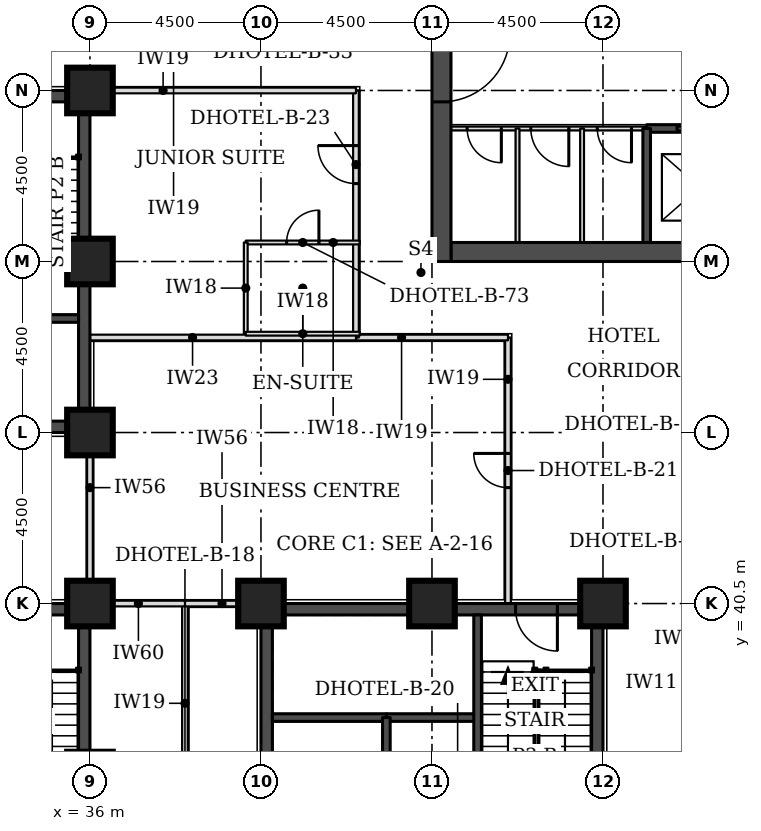
"""IFC4 building model, lengths in metres.
Left out: names, types, materials, properties, quantities, classifications, styles, units other than length and angle.
Written with IfcOpenShell. Run it as: python <this file> out.ifc"""

import sys

from ifc_helpers import new_model, si_unit, direction, frame, frame_2d, origin, origin_2d, place, context, subcontext, project, spatial, rectangle, extrude, element, fill, save


model = new_model("IFC4")
c1 = context("Model", 3, precision=1e-05, world=origin(), true_north=direction((0.0, 1.0)))
c2 = subcontext(c1, "Body", "Model", "MODEL_VIEW")
j1 = project(units=[si_unit("LENGTHUNIT", "METRE"), si_unit("PLANEANGLEUNIT", "RADIAN")], contexts=[c1])
p1 = place(None, origin())
s1 = spatial("IfcSite", under=j1, at=p1, CompositionType="ELEMENT")
p2 = place(p1, origin())
s2 = spatial("IfcBuilding", under=s1, at=p2, CompositionType="ELEMENT")
p3 = place(p2, frame((0.0, 0.0, 52.8)))
s3 = spatial("IfcBuildingStorey", under=s2, at=p3, CompositionType="ELEMENT", Elevation=52.8)
for number, where, z_axis, x_axis in (
    (1, (36.0, 40.5, 0.0), (0.0, 0.0, 1.0), (1.0, 0.0, 0.0)),
    (2, (40.5, 40.5, 0.0), (0.0, 0.0, 1.0), (1.0, 0.0, 0.0)),
    (3, (45.0, 40.5, 0.0), (0.0, 0.0, 1.0), (1.0, 0.0, 0.0)),
    (4, (49.5, 40.5, 0.0), (0.0, 0.0, 1.0), (1.0, 0.0, 0.0)),
    (5, (36.0, 45.0, 0.0), (0.0, 0.0, 1.0), (1.0, 0.0, 0.0)),
    (6, (36.0, 49.5, 0.0), (0.0, 0.0, 1.0), (1.0, 0.0, 0.0)),
    (7, (36.0, 54.0, 0.0), (0.0, 0.0, 1.0), (1.0, 0.0, 0.0)),
):
    element("IfcColumn", number, at=place(p3, frame(where, z_axis=z_axis, x_axis=x_axis)), inside=s3, PredefinedType="COLUMN", context=c2, shape_type="SweptSolid", body=[
        extrude(rectangle(XDim=1.2, YDim=1.2, at=origin_2d()), origin(), (0.0, 0.0, 1.0), 3.3),
    ])
p4 = place(p3, frame((45.5, 49.75, 0.0), z_axis=(0.0, 0.0, 1.0), x_axis=(1.0, 0.0, 0.0)))
e8 = element("IfcWall", 8, at=p4, inside=s3, PredefinedType="SHEAR", context=c2, shape_type="SweptSolid", body=[
    extrude(rectangle(XDim=21.5, YDim=0.5, at=frame_2d((10.75, 0.0))), origin(), (0.0, 0.0, 1.0), 3.3),
])
p5 = place(p3, frame((45.25, 49.5, 0.0), z_axis=(0.0, 0.0, 1.0), x_axis=(0.0, 1.0, 0.0)))
e9 = element("IfcWall", 9, at=p5, inside=s3, PredefinedType="SHEAR", context=c2, shape_type="SweptSolid", body=[
    extrude(rectangle(XDim=22.5, YDim=0.5, at=frame_2d((11.25, 0.0))), origin(), (0.0, 0.0, 1.0), 3.3),
])
p6 = place(p5, frame((4.2, 0.0, 0.0)))
e10 = element("IfcOpeningElement", 10, at=p6, cuts=e9, PredefinedType="OPENING", context=c2, shape_type="SweptSolid", body=[
    extrude(rectangle(XDim=1.8, YDim=2.1, at=frame_2d((0.9, 1.05))), frame((0.0, 0.26, 0.0), z_axis=(0.0, -1.0, 0.0), x_axis=(1.0, 0.0, 0.0)), (0.0, 0.0, 1.0), 0.52),
])
p7 = place(p5, frame((6.9, 0.0, 0.0)))
e11 = element("IfcOpeningElement", 11, at=p7, cuts=e9, PredefinedType="OPENING", context=c2, shape_type="SweptSolid", body=[
    extrude(rectangle(XDim=1.1, YDim=2.1, at=frame_2d((0.55, 1.05))), frame((0.0, 0.26, 0.0), z_axis=(0.0, -1.0, 0.0), x_axis=(1.0, 0.0, 0.0)), (0.0, 0.0, 1.0), 0.52),
])
p8 = place(p5, frame((13.6, 0.0, 0.0)))
e12 = element("IfcOpeningElement", 12, at=p8, cuts=e9, PredefinedType="OPENING", context=c2, shape_type="SweptSolid", body=[
    extrude(rectangle(XDim=1.1, YDim=2.1, at=frame_2d((0.55, 1.05))), frame((0.0, 0.26, 0.0), z_axis=(0.0, -1.0, 0.0), x_axis=(1.0, 0.0, 0.0)), (0.0, 0.0, 1.0), 0.52),
])
p9 = place(p5, frame((16.5, 0.0, 0.0)))
e13 = element("IfcOpeningElement", 13, at=p9, cuts=e9, PredefinedType="OPENING", context=c2, shape_type="SweptSolid", body=[
    extrude(rectangle(XDim=1.8, YDim=2.1, at=frame_2d((0.9, 1.05))), frame((0.0, 0.26, 0.0), z_axis=(0.0, -1.0, 0.0), x_axis=(1.0, 0.0, 0.0)), (0.0, 0.0, 1.0), 0.52),
])
p10 = place(p3, frame((27.3, 45.15, 0.0), z_axis=(0.0, 0.0, 1.0), x_axis=(1.0, 0.0, 0.0)))
e14 = element("IfcWall", 14, at=p10, inside=s3, PredefinedType="SHEAR", context=c2, shape_type="SweptSolid", body=[
    extrude(rectangle(XDim=8.4, YDim=0.3, at=frame_2d((4.2, 0.0))), origin(), (0.0, 0.0, 1.0), 3.3),
])
p11 = place(p10, frame((5.2, 0.0, 0.0)))
e15 = element("IfcOpeningElement", 15, at=p11, cuts=e14, PredefinedType="OPENING", context=c2, shape_type="SweptSolid", body=[
    extrude(rectangle(XDim=1.0, YDim=2.1, at=frame_2d((0.5, 1.05))), frame((0.0, 0.16, 0.0), z_axis=(0.0, -1.0, 0.0), x_axis=(1.0, 0.0, 0.0)), (0.0, 0.0, 1.0), 0.32),
])
p12 = place(p3, frame((27.3, 53.85, 0.0), z_axis=(0.0, 0.0, 1.0), x_axis=(1.0, 0.0, 0.0)))
e16 = element("IfcWall", 16, at=p12, inside=s3, PredefinedType="SHEAR", context=c2, shape_type="SweptSolid", body=[
    extrude(rectangle(XDim=8.4, YDim=0.3, at=frame_2d((4.2, 0.0))), origin(), (0.0, 0.0, 1.0), 3.3),
])
p13 = place(p12, frame((6.4, 0.0, 0.0)))
e17 = element("IfcOpeningElement", 17, at=p13, cuts=e16, PredefinedType="OPENING", context=c2, shape_type="SweptSolid", body=[
    extrude(rectangle(XDim=1.1, YDim=2.1, at=frame_2d((0.55, 1.05))), frame((0.0, 0.16, 0.0), z_axis=(0.0, -1.0, 0.0), x_axis=(1.0, 0.0, 0.0)), (0.0, 0.0, 1.0), 0.32),
])
p14 = place(p3, frame((35.85, 45.0, 0.0), z_axis=(0.0, 0.0, 1.0), x_axis=(0.0, 1.0, 0.0)))
e18 = element("IfcWall", 18, at=p14, inside=s3, PredefinedType="SHEAR", context=c2, shape_type="SweptSolid", body=[
    extrude(rectangle(XDim=9.0, YDim=0.3, at=frame_2d((4.5, 0.0))), origin(), (0.0, 0.0, 1.0), 3.3),
])
p15 = place(p3, frame((40.8, 40.35, 0.0), z_axis=(0.0, 0.0, 1.0), x_axis=(1.0, 0.0, 0.0)))
e19 = element("IfcWall", 19, at=p15, inside=s3, PredefinedType="SHEAR", context=c2, shape_type="SweptSolid", body=[
    extrude(rectangle(XDim=8.4, YDim=0.3, at=frame_2d((4.2, 0.0))), origin(), (0.0, 0.0, 1.0), 3.3),
])
p16 = place(p15, frame((6.4, 0.0, 0.0)))
e20 = element("IfcOpeningElement", 20, at=p16, cuts=e19, PredefinedType="OPENING", context=c2, shape_type="SweptSolid", body=[
    extrude(rectangle(XDim=1.1, YDim=2.1, at=frame_2d((0.55, 1.05))), frame((0.0, 0.16, 0.0), z_axis=(0.0, -1.0, 0.0), x_axis=(1.0, 0.0, 0.0)), (0.0, 0.0, 1.0), 0.32),
])
p17 = place(p3, frame((40.65, 31.5, 0.0), z_axis=(0.0, 0.0, 1.0), x_axis=(0.0, 1.0, 0.0)))
e21 = element("IfcWall", 21, at=p17, inside=s3, PredefinedType="SHEAR", context=c2, shape_type="SweptSolid", body=[
    extrude(rectangle(XDim=9.0, YDim=0.3, at=frame_2d((4.5, 0.0))), origin(), (0.0, 0.0, 1.0), 3.3),
])
p18 = place(p17, frame((0.4, 0.0, 0.0)))
e22 = element("IfcOpeningElement", 22, at=p18, cuts=e21, PredefinedType="OPENING", context=c2, shape_type="SweptSolid", body=[
    extrude(rectangle(XDim=1.1, YDim=2.1, at=frame_2d((0.55, 1.05))), frame((0.0, 0.16, 0.0), z_axis=(0.0, -1.0, 0.0), x_axis=(1.0, 0.0, 0.0)), (0.0, 0.0, 1.0), 0.32),
])
p19 = place(p3, frame((49.35, 31.5, 0.0), z_axis=(0.0, 0.0, 1.0), x_axis=(0.0, 1.0, 0.0)))
e23 = element("IfcWall", 23, at=p19, inside=s3, PredefinedType="SHEAR", context=c2, shape_type="SweptSolid", body=[
    extrude(rectangle(XDim=9.0, YDim=0.3, at=frame_2d((4.5, 0.0))), origin(), (0.0, 0.0, 1.0), 3.3),
])
p20 = place(p3, frame((27.3, 40.35, 0.0), z_axis=(0.0, 0.0, 1.0), x_axis=(1.0, 0.0, 0.0)))
e24 = element("IfcWall", 24, at=p20, inside=s3, PredefinedType="SHEAR", context=c2, shape_type="SweptSolid", body=[
    extrude(rectangle(XDim=8.4, YDim=0.3, at=frame_2d((4.2, 0.0))), origin(), (0.0, 0.0, 1.0), 3.3),
])
p21 = place(p20, frame((6.4, 0.0, 0.0)))
e25 = element("IfcOpeningElement", 25, at=p21, cuts=e24, PredefinedType="OPENING", context=c2, shape_type="SweptSolid", body=[
    extrude(rectangle(XDim=1.1, YDim=2.1, at=frame_2d((0.55, 1.05))), frame((0.0, 0.16, 0.0), z_axis=(0.0, -1.0, 0.0), x_axis=(1.0, 0.0, 0.0)), (0.0, 0.0, 1.0), 0.32),
])
p22 = place(p3, frame((35.85, 31.5, 0.0), z_axis=(0.0, 0.0, 1.0), x_axis=(0.0, 1.0, 0.0)))
e26 = element("IfcWall", 26, at=p22, inside=s3, PredefinedType="SHEAR", context=c2, shape_type="SweptSolid", body=[
    extrude(rectangle(XDim=9.0, YDim=0.3, at=frame_2d((4.5, 0.0))), origin(), (0.0, 0.0, 1.0), 3.3),
])
p23 = place(p3, frame((38.5, 25.65, 0.0), z_axis=(0.0, 0.0, 1.0), x_axis=(0.0, 1.0, 0.0)))
e27 = element("IfcWall", 27, at=p23, inside=s3, PredefinedType="PARTITIONING", context=c2, shape_type="SweptSolid", body=[
    extrude(rectangle(XDim=14.85, YDim=0.15, at=frame_2d((7.425, 0.0))), origin(), (0.0, 0.0, 1.0), 3.08),
])
p24 = place(p23, frame((7.54, 0.0, 0.0)))
e28 = element("IfcOpeningElement", 28, at=p24, cuts=e27, PredefinedType="OPENING", context=c2, shape_type="SweptSolid", body=[
    extrude(rectangle(XDim=0.9, YDim=2.1, at=frame_2d((0.45, 1.05))), frame((0.0, 0.085, 0.0), z_axis=(0.0, -1.0, 0.0), x_axis=(1.0, 0.0, 0.0)), (0.0, 0.0, 1.0), 0.17),
])
p25 = place(p3, frame((38.5, 40.5, 0.0), z_axis=(0.0, 0.0, 1.0), x_axis=(1.0, 0.0, 0.0)))
e29 = element("IfcWall", 29, at=p25, inside=s3, PredefinedType="PARTITIONING", context=c2, shape_type="SweptSolid", body=[
    extrude(rectangle(XDim=1.95, YDim=0.15, at=frame_2d((0.975, 0.0))), origin(), (0.0, 0.0, 1.0), 2.33),
])
p26 = place(p3, frame((36.0, 40.55, 0.0), z_axis=(0.0, 0.0, 1.0), x_axis=(0.0, 1.0, 0.0)))
e30 = element("IfcWall", 30, at=p26, inside=s3, PredefinedType="PARTITIONING", context=c2, shape_type="SweptSolid", body=[
    extrude(rectangle(XDim=4.4, YDim=0.15, at=frame_2d((2.2, 0.0))), origin(), (0.0, 0.0, 1.0), 2.33),
])
p27 = place(p3, frame((47.0, 40.5, 0.0), z_axis=(0.0, 0.0, 1.0), x_axis=(0.0, 1.0, 0.0)))
e31 = element("IfcWall", 31, at=p27, inside=s3, PredefinedType="PARTITIONING", context=c2, shape_type="SweptSolid", body=[
    extrude(rectangle(XDim=7.0, YDim=0.15, at=frame_2d((3.5, 0.0))), origin(), (0.0, 0.0, 1.0), 3.08),
])
p28 = place(p27, frame((3.05, 0.0, 0.0)))
e32 = element("IfcOpeningElement", 32, at=p28, cuts=e31, PredefinedType="OPENING", context=c2, shape_type="SweptSolid", body=[
    extrude(rectangle(XDim=0.9, YDim=2.1, at=frame_2d((0.45, 1.05))), frame((0.0, 0.085, 0.0), z_axis=(0.0, -1.0, 0.0), x_axis=(1.0, 0.0, 0.0)), (0.0, 0.0, 1.0), 0.17),
])
p29 = place(p3, frame((43.0, 47.5, 0.0), z_axis=(0.0, 0.0, 1.0), x_axis=(1.0, 0.0, 0.0)))
e33 = element("IfcWall", 33, at=p29, inside=s3, PredefinedType="PARTITIONING", context=c2, shape_type="SweptSolid", body=[
    extrude(rectangle(XDim=4.0, YDim=0.15, at=frame_2d((2.0, 0.0))), origin(), (0.0, 0.0, 1.0), 3.08),
])
p30 = place(p3, frame((43.0, 47.5, 0.0), z_axis=(0.0, 0.0, 1.0), x_axis=(0.0, 1.0, 0.0)))
e34 = element("IfcWall", 34, at=p30, inside=s3, PredefinedType="PARTITIONING", context=c2, shape_type="SweptSolid", body=[
    extrude(rectangle(XDim=6.5, YDim=0.15, at=frame_2d((3.25, 0.0))), origin(), (0.0, 0.0, 1.0), 3.08),
])
p31 = place(p30, frame((4.05, 0.0, 0.0)))
e35 = element("IfcOpeningElement", 35, at=p31, cuts=e34, PredefinedType="OPENING", context=c2, shape_type="SweptSolid", body=[
    extrude(rectangle(XDim=1.0, YDim=2.1, at=frame_2d((0.5, 1.05))), frame((0.0, 0.085, 0.0), z_axis=(0.0, -1.0, 0.0), x_axis=(1.0, 0.0, 0.0)), (0.0, 0.0, 1.0), 0.17),
])
p32 = place(p3, frame((36.05, 54.0, 0.0), z_axis=(0.0, 0.0, 1.0), x_axis=(1.0, 0.0, 0.0)))
e36 = element("IfcWall", 36, at=p32, inside=s3, PredefinedType="PARTITIONING", context=c2, shape_type="SweptSolid", body=[
    extrude(rectangle(XDim=6.95, YDim=0.15, at=frame_2d((3.475, 0.0))), origin(), (0.0, 0.0, 1.0), 3.08),
])
p33 = place(p3, frame((36.05, 40.5, 0.0), z_axis=(0.0, 0.0, 1.0), x_axis=(1.0, 0.0, 0.0)))
e37 = element("IfcWall", 37, at=p33, inside=s3, PredefinedType="PARTITIONING", context=c2, shape_type="SweptSolid", body=[
    extrude(rectangle(XDim=2.45, YDim=0.15, at=frame_2d((1.225, 0.0))), origin(), (0.0, 0.0, 1.0), 2.33),
])
p34 = place(p3, frame((36.0, 47.5, 0.0), z_axis=(0.0, 0.0, 1.0), x_axis=(1.0, 0.0, 0.0)))
e38 = element("IfcWall", 38, at=p34, inside=s3, PredefinedType="PARTITIONING", context=c2, shape_type="SweptSolid", body=[
    extrude(rectangle(XDim=7.0, YDim=0.15, at=frame_2d((3.5, 0.0))), origin(), (0.0, 0.0, 1.0), 3.08),
])
p35 = place(p3, frame((43.1, 50.0, 0.0), z_axis=(0.0, 0.0, 1.0), x_axis=(-1.0, 0.0, 0.0)))
e39 = element("IfcWall", 39, at=p35, inside=s3, PredefinedType="PARTITIONING", context=c2, shape_type="SweptSolid", body=[
    extrude(rectangle(XDim=3.0, YDim=0.1, at=frame_2d((1.5, 0.0))), origin(), (0.0, 0.0, 1.0), 3.08),
])
p36 = place(p35, frame((1.075, 0.0, 0.0)))
e40 = element("IfcOpeningElement", 40, at=p36, cuts=e39, PredefinedType="OPENING", context=c2, shape_type="SweptSolid", body=[
    extrude(rectangle(XDim=0.85, YDim=2.1, at=frame_2d((0.425, 1.05))), frame((0.0, 0.06, 0.0), z_axis=(0.0, -1.0, 0.0), x_axis=(1.0, 0.0, 0.0)), (0.0, 0.0, 1.0), 0.12),
])
p37 = place(p3, frame((40.1, 50.0, 0.0), z_axis=(0.0, 0.0, 1.0), x_axis=(0.0, -1.0, 0.0)))
e41 = element("IfcWall", 41, at=p37, inside=s3, PredefinedType="PARTITIONING", context=c2, shape_type="SweptSolid", body=[
    extrude(rectangle(XDim=2.4, YDim=0.1, at=frame_2d((1.2, 0.0))), origin(), (0.0, 0.0, 1.0), 3.08),
])
p38 = place(p3, frame((40.1, 47.6, 0.0), z_axis=(0.0, 0.0, 1.0), x_axis=(1.0, 0.0, 0.0)))
e42 = element("IfcWall", 42, at=p38, inside=s3, PredefinedType="PARTITIONING", context=c2, shape_type="SweptSolid", body=[
    extrude(rectangle(XDim=3.0, YDim=0.1, at=frame_2d((1.5, 0.0))), origin(), (0.0, 0.0, 1.0), 3.08),
])
p39 = place(p3, frame((45.5, 53.0, 0.0), z_axis=(0.0, 0.0, 1.0), x_axis=(1.0, 0.0, 0.0)))
e43 = element("IfcWall", 43, at=p39, inside=s3, PredefinedType="PARTITIONING", context=c2, shape_type="SweptSolid", body=[
    extrude(rectangle(XDim=5.15, YDim=0.1, at=frame_2d((2.575, 0.0))), origin(), (0.0, 0.0, 1.0), 3.08),
])
p40 = place(p39, frame((0.426, 0.0, 0.0)))
e44 = element("IfcOpeningElement", 44, at=p40, cuts=e43, PredefinedType="OPENING", context=c2, shape_type="SweptSolid", body=[
    extrude(rectangle(XDim=0.9, YDim=2.1, at=frame_2d((0.45, 1.05))), frame((0.0, 0.06, 0.0), z_axis=(0.0, -1.0, 0.0), x_axis=(1.0, 0.0, 0.0)), (0.0, 0.0, 1.0), 0.12),
])
p41 = place(p39, frame((2.101, 0.0, 0.0)))
e45 = element("IfcOpeningElement", 45, at=p41, cuts=e43, PredefinedType="OPENING", context=c2, shape_type="SweptSolid", body=[
    extrude(rectangle(XDim=1.0, YDim=2.1, at=frame_2d((0.5, 1.05))), frame((0.0, 0.06, 0.0), z_axis=(0.0, -1.0, 0.0), x_axis=(1.0, 0.0, 0.0)), (0.0, 0.0, 1.0), 0.12),
])
p42 = place(p39, frame((3.85, 0.0, 0.0)))
e46 = element("IfcOpeningElement", 46, at=p42, cuts=e43, PredefinedType="OPENING", context=c2, shape_type="SweptSolid", body=[
    extrude(rectangle(XDim=0.9, YDim=2.1, at=frame_2d((0.45, 1.05))), frame((0.0, 0.06, 0.0), z_axis=(0.0, -1.0, 0.0), x_axis=(1.0, 0.0, 0.0)), (0.0, 0.0, 1.0), 0.12),
])
p43 = place(p3, frame((50.65, 53.0, 0.0), z_axis=(0.0, 0.0, 1.0), x_axis=(1.0, 0.0, 0.0)))
e47 = element("IfcWall", 47, at=p43, inside=s3, PredefinedType="SOLIDWALL", context=c2, shape_type="SweptSolid", body=[
    extrude(rectangle(XDim=11.2, YDim=0.2, at=frame_2d((5.6, 0.0))), origin(), (0.0, 0.0, 1.0), 3.08),
])
p44 = place(p43, frame((0.8, 0.0, 0.0)))
e48 = element("IfcOpeningElement", 48, at=p44, cuts=e47, PredefinedType="OPENING", context=c2, shape_type="SweptSolid", body=[
    extrude(rectangle(XDim=1.2, YDim=2.1, at=frame_2d((0.6, 1.05))), frame((0.0, 0.11, 0.0), z_axis=(0.0, -1.0, 0.0), x_axis=(1.0, 0.0, 0.0)), (0.0, 0.0, 1.0), 0.22),
])
p45 = place(p43, frame((3.6, 0.0, 0.0)))
e49 = element("IfcOpeningElement", 49, at=p45, cuts=e47, PredefinedType="OPENING", context=c2, shape_type="SweptSolid", body=[
    extrude(rectangle(XDim=1.2, YDim=2.1, at=frame_2d((0.6, 1.05))), frame((0.0, 0.11, 0.0), z_axis=(0.0, -1.0, 0.0), x_axis=(1.0, 0.0, 0.0)), (0.0, 0.0, 1.0), 0.22),
])
p46 = place(p43, frame((6.4, 0.0, 0.0)))
e50 = element("IfcOpeningElement", 50, at=p46, cuts=e47, PredefinedType="OPENING", context=c2, shape_type="SweptSolid", body=[
    extrude(rectangle(XDim=1.2, YDim=2.1, at=frame_2d((0.6, 1.05))), frame((0.0, 0.11, 0.0), z_axis=(0.0, -1.0, 0.0), x_axis=(1.0, 0.0, 0.0)), (0.0, 0.0, 1.0), 0.22),
])
p47 = place(p43, frame((9.2, 0.0, 0.0)))
e51 = element("IfcOpeningElement", 51, at=p47, cuts=e47, PredefinedType="OPENING", context=c2, shape_type="SweptSolid", body=[
    extrude(rectangle(XDim=1.2, YDim=2.1, at=frame_2d((0.6, 1.05))), frame((0.0, 0.11, 0.0), z_axis=(0.0, -1.0, 0.0), x_axis=(1.0, 0.0, 0.0)), (0.0, 0.0, 1.0), 0.22),
])
for number, where, z_axis, x_axis in (
    (52, (47.251, 50.0, 0.0), (0.0, 0.0, 1.0), (0.0, 1.0, 0.0)),
    (53, (48.95, 50.0, 0.0), (0.0, 0.0, 1.0), (0.0, 1.0, 0.0)),
):
    element("IfcWall", number, at=place(p3, frame(where, z_axis=z_axis, x_axis=x_axis)), inside=s3, PredefinedType="PARTITIONING", context=c2, shape_type="SweptSolid", body=[
        extrude(rectangle(XDim=3.0, YDim=0.1, at=frame_2d((1.5, 0.0))), origin(), (0.0, 0.0, 1.0), 3.08),
    ])
for number, where, z_axis, x_axis in (
    (54, (50.65, 50.0, 0.0), (0.0, 0.0, 1.0), (0.0, 1.0, 0.0)),
    (55, (32.7, 48.0, 0.0), (0.0, 0.0, 1.0), (1.0, 0.0, 0.0)),
):
    element("IfcWall", number, at=place(p3, frame(where, z_axis=z_axis, x_axis=x_axis)), inside=s3, PredefinedType="SOLIDWALL", context=c2, shape_type="SweptSolid", body=[
        extrude(rectangle(XDim=3.0, YDim=0.2, at=frame_2d((1.5, 0.0))), origin(), (0.0, 0.0, 1.0), 3.08),
    ])
p48 = place(p3, frame((43.8, 37.5, 0.0), z_axis=(0.0, 0.0, 1.0), x_axis=(1.0, 0.0, 0.0)))
e56 = element("IfcWall", 56, at=p48, inside=s3, PredefinedType="SOLIDWALL", context=c2, shape_type="SweptSolid", body=[
    extrude(rectangle(XDim=2.4, YDim=0.2, at=frame_2d((1.2, 0.0))), origin(), (0.0, 0.0, 1.0), 3.3),
])
p49 = place(p3, frame((40.8, 37.5, 0.0), z_axis=(0.0, 0.0, 1.0), x_axis=(1.0, 0.0, 0.0)))
e57 = element("IfcWall", 57, at=p49, inside=s3, PredefinedType="SOLIDWALL", context=c2, shape_type="SweptSolid", body=[
    extrude(rectangle(XDim=3.0, YDim=0.2, at=frame_2d((1.5, 0.0))), origin(), (0.0, 0.0, 1.0), 3.08),
])
for number, where, z_axis, x_axis in (
    (58, (43.8, 31.8, 0.0), (0.0, 0.0, 1.0), (0.0, 1.0, 0.0)),
    (59, (46.2, 34.5, 0.0), (0.0, 0.0, 1.0), (0.0, 1.0, 0.0)),
):
    element("IfcWall", number, at=place(p3, frame(where, z_axis=z_axis, x_axis=x_axis)), inside=s3, PredefinedType="SOLIDWALL", context=c2, shape_type="SweptSolid", body=[
        extrude(rectangle(XDim=5.7, YDim=0.2, at=frame_2d((2.85, 0.0))), origin(), (0.0, 0.0, 1.0), 3.08),
    ])
p50 = place(p28, origin())
e60 = element("IfcDoor", 60, at=p50, inside=s3, OperationType="SINGLE_SWING_RIGHT", PredefinedType="DOOR", context=c2, shape_type="SweptSolid", body=[
    extrude(rectangle(XDim=0.9, YDim=2.1, at=frame_2d((0.45, 1.05))), frame((0.0, 0.025, 0.0), z_axis=(0.0, -1.0, 0.0), x_axis=(1.0, 0.0, 0.0)), (0.0, 0.0, 1.0), 0.05),
])
fill(e32, e60)
p51 = place(p31, origin())
e61 = element("IfcDoor", 61, at=p51, inside=s3, OperationType="SINGLE_SWING_RIGHT", PredefinedType="DOOR", context=c2, shape_type="SweptSolid", body=[
    extrude(rectangle(XDim=1.0, YDim=2.1, at=frame_2d((0.5, 1.05))), frame((0.0, 0.025, 0.0), z_axis=(0.0, -1.0, 0.0), x_axis=(1.0, 0.0, 0.0)), (0.0, 0.0, 1.0), 0.05),
])
fill(e35, e61)
p52 = place(p36, frame((0.85, 0.0, 0.0), z_axis=(0.0, 0.0, 1.0), x_axis=(-1.0, 0.0, 0.0)))
e62 = element("IfcDoor", 62, at=p52, inside=s3, OperationType="SINGLE_SWING_RIGHT", PredefinedType="DOOR", context=c2, shape_type="SweptSolid", body=[
    extrude(rectangle(XDim=0.85, YDim=2.1, at=frame_2d((0.425, 1.05))), frame((0.0, 0.025, 0.0), z_axis=(0.0, -1.0, 0.0), x_axis=(1.0, 0.0, 0.0)), (0.0, 0.0, 1.0), 0.05),
])
fill(e40, e62)
p53 = place(p44, origin())
e63 = element("IfcDoor", 63, at=p53, inside=s3, OperationType="DOUBLE_DOOR_SLIDING", PredefinedType="DOOR", context=c2, shape_type="SweptSolid", body=[
    extrude(rectangle(XDim=1.2, YDim=2.1, at=frame_2d((0.6, 1.05))), frame((0.0, 0.025, 0.0), z_axis=(0.0, -1.0, 0.0), x_axis=(1.0, 0.0, 0.0)), (0.0, 0.0, 1.0), 0.05),
])
fill(e48, e63)
p54 = place(p6, frame((1.8, 0.0, 0.0), z_axis=(0.0, 0.0, 1.0), x_axis=(-1.0, 0.0, 0.0)))
e64 = element("IfcDoor", 64, at=p54, inside=s3, OperationType="SINGLE_SWING_LEFT", PredefinedType="DOOR", context=c2, shape_type="SweptSolid", body=[
    extrude(rectangle(XDim=1.8, YDim=2.1, at=frame_2d((0.9, 1.05))), frame((0.0, 0.025, 0.0), z_axis=(0.0, -1.0, 0.0), x_axis=(1.0, 0.0, 0.0)), (0.0, 0.0, 1.0), 0.05),
])
fill(e10, e64)
p55 = place(p40, frame((0.9, 0.0, 0.0), z_axis=(0.0, 0.0, 1.0), x_axis=(-1.0, 0.0, 0.0)))
e65 = element("IfcDoor", 65, at=p55, inside=s3, OperationType="SINGLE_SWING_LEFT", PredefinedType="DOOR", context=c2, shape_type="SweptSolid", body=[
    extrude(rectangle(XDim=0.9, YDim=2.1, at=frame_2d((0.45, 1.05))), frame((0.0, 0.025, 0.0), z_axis=(0.0, -1.0, 0.0), x_axis=(1.0, 0.0, 0.0)), (0.0, 0.0, 1.0), 0.05),
])
fill(e44, e65)
p56 = place(p41, frame((1.0, 0.0, 0.0), z_axis=(0.0, 0.0, 1.0), x_axis=(-1.0, 0.0, 0.0)))
e66 = element("IfcDoor", 66, at=p56, inside=s3, OperationType="SINGLE_SWING_LEFT", PredefinedType="DOOR", context=c2, shape_type="SweptSolid", body=[
    extrude(rectangle(XDim=1.0, YDim=2.1, at=frame_2d((0.5, 1.05))), frame((0.0, 0.025, 0.0), z_axis=(0.0, -1.0, 0.0), x_axis=(1.0, 0.0, 0.0)), (0.0, 0.0, 1.0), 0.05),
])
fill(e45, e66)
p57 = place(p42, frame((0.9, 0.0, 0.0), z_axis=(0.0, 0.0, 1.0), x_axis=(-1.0, 0.0, 0.0)))
e67 = element("IfcDoor", 67, at=p57, inside=s3, OperationType="SINGLE_SWING_LEFT", PredefinedType="DOOR", context=c2, shape_type="SweptSolid", body=[
    extrude(rectangle(XDim=0.9, YDim=2.1, at=frame_2d((0.45, 1.05))), frame((0.0, 0.025, 0.0), z_axis=(0.0, -1.0, 0.0), x_axis=(1.0, 0.0, 0.0)), (0.0, 0.0, 1.0), 0.05),
])
fill(e46, e67)
p58 = place(p16, frame((1.1, 0.0, 0.0), z_axis=(0.0, 0.0, 1.0), x_axis=(-1.0, 0.0, 0.0)))
e68 = element("IfcDoor", 68, at=p58, inside=s3, OperationType="SINGLE_SWING_LEFT", PredefinedType="DOOR", context=c2, shape_type="SweptSolid", body=[
    extrude(rectangle(XDim=1.1, YDim=2.1, at=frame_2d((0.55, 1.05))), frame((0.0, 0.025, 0.0), z_axis=(0.0, -1.0, 0.0), x_axis=(1.0, 0.0, 0.0)), (0.0, 0.0, 1.0), 0.05),
])
fill(e20, e68)
save(model, sys.argv[1])
